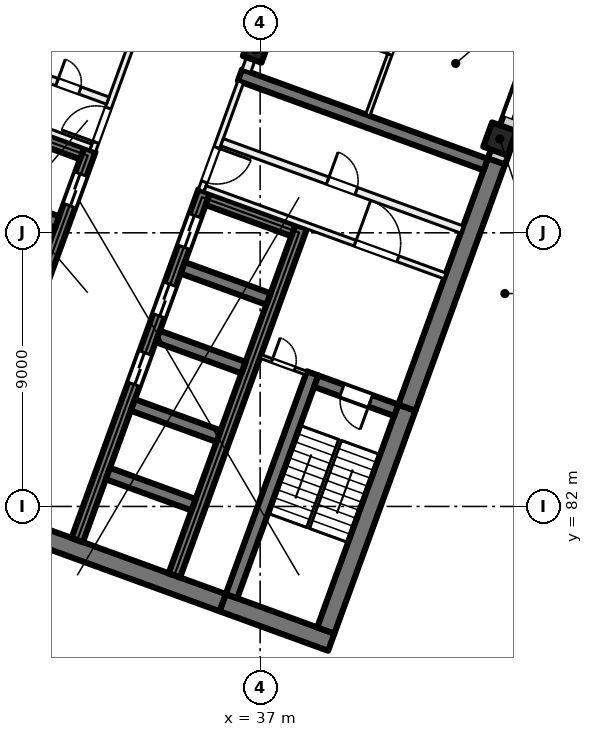
"""IFC4 building model, lengths in metres.
Left out: names, types, materials, properties, quantities, classifications, styles, units other than length and angle.
Written with IfcOpenShell. Run it as: python <this file> out.ifc"""

import sys

from ifc_helpers import new_model, si_unit, direction, frame, frame_2d, origin, origin_2d, place, context, subcontext, project, spatial, rectangle, extrude, element, fill, save


model = new_model("IFC4")
c1 = context("Model", 3, precision=1e-05, world=origin(), true_north=direction((0.0, 1.0)))
c2 = subcontext(c1, "Body", "Model", "MODEL_VIEW")
j1 = project(units=[si_unit("LENGTHUNIT", "METRE"), si_unit("PLANEANGLEUNIT", "RADIAN")], contexts=[c1])
p1 = place(None, origin())
s1 = spatial("IfcSite", under=j1, at=p1, CompositionType="ELEMENT")
p2 = place(p1, origin())
s2 = spatial("IfcBuilding", under=s1, at=p2, CompositionType="ELEMENT")
p3 = place(p2, frame((0.0, 0.0, 85.0)))
s3 = spatial("IfcBuildingStorey", under=s2, at=p3, CompositionType="ELEMENT", Elevation=85.0)
p4 = place(p3, frame((36.849, 97.011, 0.0), z_axis=(0.0, 0.0, 1.0), x_axis=(-0.342020143326, -0.939692620786, 0.0)))
e1 = element("IfcColumn", 1, at=p4, inside=s3, PredefinedType="COLUMN", context=c2, shape_type="SweptSolid", body=[
    extrude(rectangle(XDim=0.65, YDim=0.65, at=origin_2d()), origin(), (0.0, 0.0, 1.0), 4.0),
])
p5 = place(p3, frame((44.884, 94.087, 0.0), z_axis=(0.0, 0.0, 1.0), x_axis=(-0.342020143326, -0.939692620786, 0.0)))
e2 = element("IfcColumn", 2, at=p5, inside=s3, PredefinedType="COLUMN", context=c2, shape_type="SweptSolid", body=[
    extrude(rectangle(XDim=0.85, YDim=0.85, at=origin_2d()), origin(), (0.0, 0.0, 1.0), 4.0),
])
p6 = place(p3, frame((39.338, 77.535, 0.0), z_axis=(0.0, 0.0, 1.0), x_axis=(-0.939701471648, 0.341995824804, 0.0)))
e3 = element("IfcWall", 3, at=p6, inside=s3, PredefinedType="SHEAR", context=c2, shape_type="SweptSolid", body=[
    extrude(rectangle(XDim=3.8, YDim=0.6, at=frame_2d((1.9, 0.0))), origin(), (0.0, 0.0, 1.0), 4.0),
])
p7 = place(p3, frame((35.767, 78.835, 0.0), z_axis=(0.0, 0.0, 1.0), x_axis=(-0.939692894512, 0.342019391267, 0.0)))
e4 = element("IfcWall", 4, at=p7, inside=s3, PredefinedType="SHEAR", context=c2, shape_type="SweptSolid", body=[
    extrude(rectangle(XDim=14.4, YDim=0.6, at=frame_2d((7.2, 0.0))), origin(), (0.0, 0.0, 1.0), 4.0),
])
p8 = place(p3, frame((39.159, 77.92, 0.0), z_axis=(0.0, 0.0, 1.0), x_axis=(0.342016982193, 0.939693771338, 0.0)))
e5 = element("IfcWall", 5, at=p8, inside=s3, PredefinedType="SHEAR", context=c2, shape_type="SweptSolid", body=[
    extrude(rectangle(XDim=7.8, YDim=0.6, at=frame_2d((3.9, 0.0))), origin(), (0.0, 0.0, 1.0), 4.0),
])
p9 = place(p3, frame((41.827, 85.249, 0.0), z_axis=(0.0, 0.0, 1.0), x_axis=(0.342017595281, 0.939693548195, 0.0)))
e6 = element("IfcWall", 6, at=p9, inside=s3, PredefinedType="SHEAR", context=c2, shape_type="SweptSolid", body=[
    extrude(rectangle(XDim=8.925, YDim=0.6, at=frame_2d((4.462, 0.0))), origin(), (0.0, 0.0, 1.0), 4.0),
])
p10 = place(p3, frame((36.058, 79.048, 0.0), z_axis=(0.0, 0.0, 1.0), x_axis=(0.342016982193, 0.939693771338, 0.0)))
e7 = element("IfcWall", 7, at=p10, inside=s3, PredefinedType="SHEAR", context=c2, shape_type="SweptSolid", body=[
    extrude(rectangle(XDim=7.8, YDim=0.4, at=frame_2d((3.9, 0.0))), origin(), (0.0, 0.0, 1.0), 4.0),
])
p11 = place(p3, frame((41.476, 85.164, 0.0), z_axis=(0.0, 0.0, 1.0), x_axis=(-0.939678810556, 0.342058084236, 0.0)))
e8 = element("IfcWall", 8, at=p11, inside=s3, PredefinedType="SHEAR", context=c2, shape_type="SweptSolid", body=[
    extrude(rectangle(XDim=2.8, YDim=0.4, at=frame_2d((1.4, 0.0))), origin(), (0.0, 0.0, 1.0), 4.0),
])
p12 = place(p11, frame((0.9, 0.0, 0.0)))
e9 = element("IfcOpeningElement", 9, at=p12, cuts=e8, PredefinedType="OPENING", context=c2, shape_type="SweptSolid", body=[
    extrude(rectangle(XDim=1.0, YDim=2.1, at=frame_2d((0.5, 1.05))), frame((0.0, 0.21, 0.0), z_axis=(0.0, -1.0, 0.0), x_axis=(1.0, 0.0, 0.0)), (0.0, 0.0, 1.0), 0.42),
])
p13 = place(p3, frame((30.984, 80.895, 0.0), z_axis=(0.0, 0.0, 1.0), x_axis=(0.342021021735, 0.939692301071, 0.0)))
e10 = element("IfcWall", 10, at=p13, inside=s3, PredefinedType="SHEAR", context=c2, shape_type="SweptSolid", body=[
    extrude(rectangle(XDim=12.2, YDim=0.4, at=frame_2d((6.1, 0.0))), origin(), (0.0, 0.0, 1.0), 4.0),
])
p14 = place(p13, frame((5.45, 0.0, 0.0)))
e11 = element("IfcOpeningElement", 11, at=p14, cuts=e10, PredefinedType="OPENING", context=c2, shape_type="SweptSolid", body=[
    extrude(rectangle(XDim=1.1, YDim=2.1, at=frame_2d((0.55, 1.05))), frame((0.0, 0.21, 0.0), z_axis=(0.0, -1.0, 0.0), x_axis=(1.0, 0.0, 0.0)), (0.0, 0.0, 1.0), 0.42),
])
p15 = place(p13, frame((7.85, 0.0, 0.0)))
e12 = element("IfcOpeningElement", 12, at=p15, cuts=e10, PredefinedType="OPENING", context=c2, shape_type="SweptSolid", body=[
    extrude(rectangle(XDim=1.1, YDim=2.1, at=frame_2d((0.55, 1.05))), frame((0.0, 0.21, 0.0), z_axis=(0.0, -1.0, 0.0), x_axis=(1.0, 0.0, 0.0)), (0.0, 0.0, 1.0), 0.42),
])
p16 = place(p13, frame((10.25, 0.0, 0.0)))
e13 = element("IfcOpeningElement", 13, at=p16, cuts=e10, PredefinedType="OPENING", context=c2, shape_type="SweptSolid", body=[
    extrude(rectangle(XDim=1.1, YDim=2.1, at=frame_2d((0.55, 1.05))), frame((0.0, 0.21, 0.0), z_axis=(0.0, -1.0, 0.0), x_axis=(1.0, 0.0, 0.0)), (0.0, 0.0, 1.0), 0.42),
])
p17 = place(p3, frame((34.178, 79.732, 0.0), z_axis=(0.0, 0.0, 1.0), x_axis=(0.342014590177, 0.939694641948, 0.0)))
e14 = element("IfcWall", 14, at=p17, inside=s3, PredefinedType="SHEAR", context=c2, shape_type="SweptSolid", body=[
    extrude(rectangle(XDim=12.2, YDim=0.4, at=frame_2d((6.1, 0.0))), origin(), (0.0, 0.0, 1.0), 4.0),
])
for number, where, z_axis, x_axis in (
    (15, (34.812, 82.056, 0.0), (0.0, 0.0, 1.0), (-0.94, 0.342, 0.0)),
    (16, (35.632, 84.311, 0.0), (0.0, 0.0, 1.0), (-0.94, 0.342, 0.0)),
    (17, (36.453, 86.566, 0.0), (0.0, 0.0, 1.0), (-0.94, 0.342, 0.0)),
    (18, (37.274, 88.822, 0.0), (0.0, 0.0, 1.0), (-0.94, 0.342, 0.0)),
):
    element("IfcWall", number, at=place(p3, frame(where, z_axis=z_axis, x_axis=x_axis)), inside=s3, PredefinedType="SHEAR", context=c2, shape_type="SweptSolid", body=[
        extrude(rectangle(XDim=3.0, YDim=0.4, at=frame_2d((1.5, 0.0))), origin(), (0.0, 0.0, 1.0), 4.0),
    ])
p18 = place(p3, frame((38.095, 91.077, 0.0), z_axis=(0.0, 0.0, 1.0), x_axis=(-0.939676934218, 0.342063238742, 0.0)))
e19 = element("IfcWall", 19, at=p18, inside=s3, PredefinedType="SHEAR", context=c2, shape_type="SweptSolid", body=[
    extrude(rectangle(XDim=3.0, YDim=0.4, at=frame_2d((1.5, 0.0))), origin(), (0.0, 0.0, 1.0), 4.0),
])
p19 = place(p3, frame((27.225, 82.263, 0.0), z_axis=(0.0, 0.0, 1.0), x_axis=(0.342014590177, 0.939694641948, 0.0)))
e20 = element("IfcWall", 20, at=p19, inside=s3, PredefinedType="SHEAR", context=c2, shape_type="SweptSolid", body=[
    extrude(rectangle(XDim=12.2, YDim=0.4, at=frame_2d((6.1, 0.0))), origin(), (0.0, 0.0, 1.0), 4.0),
])
p20 = place(p19, frame((10.25, 0.0, 0.0)))
e21 = element("IfcOpeningElement", 21, at=p20, cuts=e20, PredefinedType="OPENING", context=c2, shape_type="SweptSolid", body=[
    extrude(rectangle(XDim=1.1, YDim=2.1, at=frame_2d((0.55, 1.05))), frame((0.0, 0.21, 0.0), z_axis=(0.0, -1.0, 0.0), x_axis=(1.0, 0.0, 0.0)), (0.0, 0.0, 1.0), 0.42),
])
p21 = place(p19, frame((0.7, 0.0, 0.0)))
e22 = element("IfcOpeningElement", 22, at=p21, cuts=e20, PredefinedType="OPENING", context=c2, shape_type="SweptSolid", body=[
    extrude(rectangle(XDim=0.8, YDim=2.1, at=frame_2d((0.4, 1.05))), frame((0.0, 0.21, 0.0), z_axis=(0.0, -1.0, 0.0), x_axis=(1.0, 0.0, 0.0)), (0.0, 0.0, 1.0), 0.42),
])
for number, where, z_axis, x_axis in (
    (23, (30.32, 91.353, 0.0), (0.0, 0.0, 1.0), (-0.94, 0.342, 0.0)),
    (24, (31.141, 93.608, 0.0), (0.0, 0.0, 1.0), (-0.94, 0.342, 0.0)),
):
    element("IfcWall", number, at=place(p3, frame(where, z_axis=z_axis, x_axis=x_axis)), inside=s3, PredefinedType="SHEAR", context=c2, shape_type="SweptSolid", body=[
        extrude(rectangle(XDim=3.0, YDim=0.4, at=frame_2d((1.5, 0.0))), origin(), (0.0, 0.0, 1.0), 4.0),
    ])
p22 = place(p3, frame((44.418, 93.245, 0.0), z_axis=(0.0, 0.0, 1.0), x_axis=(-0.93969060187, 0.342025690201, 0.0)))
e25 = element("IfcWall", 25, at=p22, inside=s3, PredefinedType="SHEAR", context=c2, shape_type="SweptSolid", body=[
    extrude(rectangle(XDim=8.6, YDim=0.4, at=frame_2d((4.3, 0.0))), origin(), (0.0, 0.0, 1.0), 4.0),
])
p23 = place(p3, frame((52.212, 113.783, 0.0), z_axis=(0.0, 0.0, 1.0), x_axis=(-0.34202521188, -0.939690775968, 0.0)))
e26 = element("IfcWall", 26, at=p23, inside=s3, PredefinedType="SOLIDWALL", context=c2, shape_type="SweptSolid", body=[
    extrude(rectangle(XDim=21.745, YDim=0.6, at=frame_2d((10.873, 0.0))), origin(), (0.0, 0.0, 1.0), 3.625),
])
p24 = place(p23, frame((3.765, 0.0, 0.9)))
e27 = element("IfcOpeningElement", 27, at=p24, cuts=e26, PredefinedType="OPENING", context=c2, shape_type="SweptSolid", body=[
    extrude(rectangle(XDim=3.0, YDim=2.4, at=frame_2d((1.5, 1.2))), frame((0.0, 0.31, 0.0), z_axis=(0.0, -1.0, 0.0), x_axis=(1.0, 0.0, 0.0)), (0.0, 0.0, 1.0), 0.62),
])
p25 = place(p23, frame((8.265, 0.0, 0.9)))
e28 = element("IfcOpeningElement", 28, at=p25, cuts=e26, PredefinedType="OPENING", context=c2, shape_type="SweptSolid", body=[
    extrude(rectangle(XDim=3.0, YDim=2.4, at=frame_2d((1.5, 1.2))), frame((0.0, 0.31, 0.0), z_axis=(0.0, -1.0, 0.0), x_axis=(1.0, 0.0, 0.0)), (0.0, 0.0, 1.0), 0.62),
])
p26 = place(p23, frame((12.765, 0.0, 0.9)))
e29 = element("IfcOpeningElement", 29, at=p26, cuts=e26, PredefinedType="OPENING", context=c2, shape_type="SweptSolid", body=[
    extrude(rectangle(XDim=3.0, YDim=2.4, at=frame_2d((1.5, 1.2))), frame((0.0, 0.31, 0.0), z_axis=(0.0, -1.0, 0.0), x_axis=(1.0, 0.0, 0.0)), (0.0, 0.0, 1.0), 0.62),
])
p27 = place(p23, frame((17.265, 0.0, 0.9)))
e30 = element("IfcOpeningElement", 30, at=p27, cuts=e26, PredefinedType="OPENING", context=c2, shape_type="SweptSolid", body=[
    extrude(rectangle(XDim=3.0, YDim=2.4, at=frame_2d((1.5, 1.2))), frame((0.0, 0.31, 0.0), z_axis=(0.0, -1.0, 0.0), x_axis=(1.0, 0.0, 0.0)), (0.0, 0.0, 1.0), 0.62),
])
p28 = place(p3, frame((31.491, 93.693, 0.0), z_axis=(0.0, 0.0, 1.0), x_axis=(0.341995824804, 0.939701471648, 0.0)))
e31 = element("IfcWall", 31, at=p28, inside=s3, PredefinedType="PARTITIONING", context=c2, shape_type="SweptSolid", body=[
    extrude(rectangle(XDim=3.8, YDim=0.2, at=frame_2d((1.9, 0.0))), origin(), (0.0, 0.0, 1.0), 3.625),
])
p29 = place(p28, frame((0.3, 0.0, 0.0)))
e32 = element("IfcOpeningElement", 32, at=p29, cuts=e31, PredefinedType="OPENING", context=c2, shape_type="SweptSolid", body=[
    extrude(rectangle(XDim=1.2, YDim=2.1, at=frame_2d((0.6, 1.05))), frame((0.0, 0.11, 0.0), z_axis=(0.0, -1.0, 0.0), x_axis=(1.0, 0.0, 0.0)), (0.0, 0.0, 1.0), 0.22),
])
p30 = place(p3, frame((23.538, 96.694, 0.0), z_axis=(0.0, 0.0, 1.0), x_axis=(0.939691552312, -0.342023078919, 0.0)))
e33 = element("IfcWall", 33, at=p30, inside=s3, PredefinedType="PARTITIONING", context=c2, shape_type="SweptSolid", body=[
    extrude(rectangle(XDim=8.4, YDim=0.2, at=frame_2d((4.2, 0.0))), origin(), (0.0, 0.0, 1.0), 3.625),
])
p31 = place(p30, frame((1.65, 0.0, 0.0)))
e34 = element("IfcOpeningElement", 34, at=p31, cuts=e33, PredefinedType="OPENING", context=c2, shape_type="SweptSolid", body=[
    extrude(rectangle(XDim=1.5, YDim=2.1, at=frame_2d((0.75, 1.05))), frame((0.0, 0.11, 0.0), z_axis=(0.0, -1.0, 0.0), x_axis=(1.0, 0.0, 0.0)), (0.0, 0.0, 1.0), 0.22),
])
p32 = place(p3, frame((24.094, 98.221, 0.0), z_axis=(0.0, 0.0, 1.0), x_axis=(0.939691552312, -0.342023078919, 0.0)))
e35 = element("IfcWall", 35, at=p32, inside=s3, PredefinedType="PARTITIONING", context=c2, shape_type="SweptSolid", body=[
    extrude(rectangle(XDim=8.4, YDim=0.25, at=frame_2d((4.2, 0.0))), origin(), (0.0, 0.0, 1.0), 3.625),
])
p33 = place(p32, frame((6.625, 0.0, 0.0)))
e36 = element("IfcOpeningElement", 36, at=p33, cuts=e35, PredefinedType="OPENING", context=c2, shape_type="SweptSolid", body=[
    extrude(rectangle(XDim=0.8, YDim=2.1, at=frame_2d((0.4, 1.05))), frame((0.0, 0.135, 0.0), z_axis=(0.0, -1.0, 0.0), x_axis=(1.0, 0.0, 0.0)), (0.0, 0.0, 1.0), 0.27),
])
p34 = place(p32, frame((2.375, 0.0, 0.0)))
e37 = element("IfcOpeningElement", 37, at=p34, cuts=e35, PredefinedType="OPENING", context=c2, shape_type="SweptSolid", body=[
    extrude(rectangle(XDim=0.8, YDim=2.1, at=frame_2d((0.4, 1.05))), frame((0.0, 0.135, 0.0), z_axis=(0.0, -1.0, 0.0), x_axis=(1.0, 0.0, 0.0)), (0.0, 0.0, 1.0), 0.27),
])
p35 = place(p3, frame((36.362, 95.964, 0.0), z_axis=(0.0, 0.0, 1.0), x_axis=(-0.341995824804, -0.939701471648, 0.0)))
e38 = element("IfcWall", 38, at=p35, inside=s3, PredefinedType="PARTITIONING", context=c2, shape_type="SweptSolid", body=[
    extrude(rectangle(XDim=3.8, YDim=0.2, at=frame_2d((1.9, 0.0))), origin(), (0.0, 0.0, 1.0), 3.625),
])
p36 = place(p35, frame((2.3, 0.0, 0.0)))
e39 = element("IfcOpeningElement", 39, at=p36, cuts=e38, PredefinedType="OPENING", context=c2, shape_type="SweptSolid", body=[
    extrude(rectangle(XDim=1.2, YDim=2.1, at=frame_2d((0.6, 1.05))), frame((0.0, 0.11, 0.0), z_axis=(0.0, -1.0, 0.0), x_axis=(1.0, 0.0, 0.0)), (0.0, 0.0, 1.0), 0.22),
])
p37 = place(p3, frame((35.19, 92.453, 0.0), z_axis=(0.0, 0.0, 1.0), x_axis=(0.939691552312, -0.342023078919, 0.0)))
e40 = element("IfcWall", 40, at=p37, inside=s3, PredefinedType="PARTITIONING", context=c2, shape_type="SweptSolid", body=[
    extrude(rectangle(XDim=8.4, YDim=0.2, at=frame_2d((4.2, 0.0))), origin(), (0.0, 0.0, 1.0), 3.625),
])
p38 = place(p37, frame((5.25, 0.0, 0.0)))
e41 = element("IfcOpeningElement", 41, at=p38, cuts=e40, PredefinedType="OPENING", context=c2, shape_type="SweptSolid", body=[
    extrude(rectangle(XDim=1.5, YDim=2.1, at=frame_2d((0.75, 1.05))), frame((0.0, 0.11, 0.0), z_axis=(0.0, -1.0, 0.0), x_axis=(1.0, 0.0, 0.0)), (0.0, 0.0, 1.0), 0.22),
])
p39 = place(p3, frame((35.746, 93.98, 0.0), z_axis=(0.0, 0.0, 1.0), x_axis=(0.939691552312, -0.342023078919, 0.0)))
e42 = element("IfcWall", 42, at=p39, inside=s3, PredefinedType="PARTITIONING", context=c2, shape_type="SweptSolid", body=[
    extrude(rectangle(XDim=8.4, YDim=0.25, at=frame_2d((4.2, 0.0))), origin(), (0.0, 0.0, 1.0), 3.625),
])
p40 = place(p39, frame((3.7, 0.0, 0.0)))
e43 = element("IfcOpeningElement", 43, at=p40, cuts=e42, PredefinedType="OPENING", context=c2, shape_type="SweptSolid", body=[
    extrude(rectangle(XDim=1.0, YDim=2.1, at=frame_2d((0.5, 1.05))), frame((0.0, 0.135, 0.0), z_axis=(0.0, -1.0, 0.0), x_axis=(1.0, 0.0, 0.0)), (0.0, 0.0, 1.0), 0.27),
])
p41 = place(p3, frame((37.013, 86.935, 0.0), z_axis=(0.0, 0.0, 1.0), x_axis=(0.939659694648, -0.342110593602, 0.0)))
e44 = element("IfcWall", 44, at=p41, inside=s3, PredefinedType="PARTITIONING", context=c2, shape_type="SweptSolid", body=[
    extrude(rectangle(XDim=1.6, YDim=0.125, at=frame_2d((0.8, 0.0))), origin(), (0.0, 0.0, 1.0), 3.625),
])
p42 = place(p41, frame((0.4, 0.0, 0.0)))
e45 = element("IfcOpeningElement", 45, at=p42, cuts=e44, PredefinedType="OPENING", context=c2, shape_type="SweptSolid", body=[
    extrude(rectangle(XDim=0.8, YDim=2.1, at=frame_2d((0.4, 1.05))), frame((0.0, 0.073, 0.0), z_axis=(0.0, -1.0, 0.0), x_axis=(1.0, 0.0, 0.0)), (0.0, 0.0, 1.0), 0.145),
])
p43 = place(p3, frame((40.539, 94.87, 0.0), z_axis=(0.0, 0.0, 1.0), x_axis=(0.342082231415, 0.939670020247, 0.0)))
e46 = element("IfcWall", 46, at=p43, inside=s3, PredefinedType="PARTITIONING", context=c2, shape_type="SweptSolid", body=[
    extrude(rectangle(XDim=9.825, YDim=0.15, at=frame_2d((4.912, 0.0))), origin(), (0.0, 0.0, 1.0), 3.625),
])
p44 = place(p43, frame((2.125, 0.0, 0.0)))
e47 = element("IfcOpeningElement", 47, at=p44, cuts=e46, PredefinedType="OPENING", context=c2, shape_type="SweptSolid", body=[
    extrude(rectangle(XDim=1.0, YDim=2.1, at=frame_2d((0.5, 1.05))), frame((0.0, 0.085, 0.0), z_axis=(0.0, -1.0, 0.0), x_axis=(1.0, 0.0, 0.0)), (0.0, 0.0, 1.0), 0.17),
])
p45 = place(p43, frame((7.0, 0.0, 0.0)))
e48 = element("IfcOpeningElement", 48, at=p45, cuts=e46, PredefinedType="OPENING", context=c2, shape_type="SweptSolid", body=[
    extrude(rectangle(XDim=1.0, YDim=2.1, at=frame_2d((0.5, 1.05))), frame((0.0, 0.085, 0.0), z_axis=(0.0, -1.0, 0.0), x_axis=(1.0, 0.0, 0.0)), (0.0, 0.0, 1.0), 0.17),
])
p46 = place(p3, frame((47.314, 125.909, 0.0), z_axis=(0.0, 0.0, 1.0), x_axis=(-0.342010770371, -0.939696032209, 0.0)))
e49 = element("IfcWall", 49, at=p46, inside=s3, PredefinedType="PARTITIONING", context=c2, shape_type="SweptSolid", body=[
    extrude(rectangle(XDim=31.485, YDim=0.3, at=frame_2d((15.742, 0.0))), origin(), (0.0, 0.0, 1.0), 3.625),
])
p47 = place(p46, frame((23.459, 0.0, 0.0)))
e50 = element("IfcOpeningElement", 50, at=p47, cuts=e49, PredefinedType="OPENING", context=c2, shape_type="SweptSolid", body=[
    extrude(rectangle(XDim=1.8, YDim=2.1, at=frame_2d((0.9, 1.05))), frame((0.0, 0.16, 0.0), z_axis=(0.0, -1.0, 0.0), x_axis=(1.0, 0.0, 0.0)), (0.0, 0.0, 1.0), 0.32),
])
p48 = place(p46, frame((5.484, 0.0, 0.0)))
e51 = element("IfcOpeningElement", 51, at=p48, cuts=e49, PredefinedType="OPENING", context=c2, shape_type="SweptSolid", body=[
    extrude(rectangle(XDim=1.0, YDim=2.1, at=frame_2d((0.5, 1.05))), frame((0.0, 0.16, 0.0), z_axis=(0.0, -1.0, 0.0), x_axis=(1.0, 0.0, 0.0)), (0.0, 0.0, 1.0), 0.32),
])
p49 = place(p27, origin())
e52 = element("IfcWindow", 52, at=p49, inside=s3, PartitioningType="SINGLE_PANEL", PredefinedType="WINDOW", context=c2, shape_type="SweptSolid", body=[
    extrude(rectangle(XDim=3.0, YDim=2.4, at=frame_2d((1.5, 1.2))), frame((0.0, 0.03, 0.0), z_axis=(0.0, -1.0, 0.0), x_axis=(1.0, 0.0, 0.0)), (0.0, 0.0, 1.0), 0.06),
])
fill(e30, e52)
p50 = place(p20, origin())
e53 = element("IfcDoor", 53, at=p50, inside=s3, OperationType="DOUBLE_DOOR_SLIDING", PredefinedType="DOOR", context=c2, shape_type="SweptSolid", body=[
    extrude(rectangle(XDim=1.1, YDim=2.1, at=frame_2d((0.55, 1.05))), frame((0.0, 0.025, 0.0), z_axis=(0.0, -1.0, 0.0), x_axis=(1.0, 0.0, 0.0)), (0.0, 0.0, 1.0), 0.05),
])
fill(e21, e53)
p51 = place(p14, origin())
e54 = element("IfcDoor", 54, at=p51, inside=s3, OperationType="DOUBLE_DOOR_SLIDING", PredefinedType="DOOR", context=c2, shape_type="SweptSolid", body=[
    extrude(rectangle(XDim=1.1, YDim=2.1, at=frame_2d((0.55, 1.05))), frame((0.0, 0.025, 0.0), z_axis=(0.0, -1.0, 0.0), x_axis=(1.0, 0.0, 0.0)), (0.0, 0.0, 1.0), 0.05),
])
fill(e11, e54)
p52 = place(p15, origin())
e55 = element("IfcDoor", 55, at=p52, inside=s3, OperationType="DOUBLE_DOOR_SLIDING", PredefinedType="DOOR", context=c2, shape_type="SweptSolid", body=[
    extrude(rectangle(XDim=1.1, YDim=2.1, at=frame_2d((0.55, 1.05))), frame((0.0, 0.025, 0.0), z_axis=(0.0, -1.0, 0.0), x_axis=(1.0, 0.0, 0.0)), (0.0, 0.0, 1.0), 0.05),
])
fill(e12, e55)
p53 = place(p16, origin())
e56 = element("IfcDoor", 56, at=p53, inside=s3, OperationType="DOUBLE_DOOR_SLIDING", PredefinedType="DOOR", context=c2, shape_type="SweptSolid", body=[
    extrude(rectangle(XDim=1.1, YDim=2.1, at=frame_2d((0.55, 1.05))), frame((0.0, 0.025, 0.0), z_axis=(0.0, -1.0, 0.0), x_axis=(1.0, 0.0, 0.0)), (0.0, 0.0, 1.0), 0.05),
])
fill(e13, e56)
p54 = place(p29, origin())
e57 = element("IfcDoor", 57, at=p54, inside=s3, OperationType="DOUBLE_DOOR_SINGLE_SWING", PredefinedType="DOOR", context=c2, shape_type="SweptSolid", body=[
    extrude(rectangle(XDim=1.2, YDim=2.1, at=frame_2d((0.6, 1.05))), frame((0.0, 0.025, 0.0), z_axis=(0.0, -1.0, 0.0), x_axis=(1.0, 0.0, 0.0)), (0.0, 0.0, 1.0), 0.05),
])
fill(e32, e57)
p55 = place(p33, origin())
e58 = element("IfcDoor", 58, at=p55, inside=s3, OperationType="SINGLE_SWING_LEFT", PredefinedType="DOOR", context=c2, shape_type="SweptSolid", body=[
    extrude(rectangle(XDim=0.8, YDim=2.1, at=frame_2d((0.4, 1.05))), frame((0.0, 0.025, 0.0), z_axis=(0.0, -1.0, 0.0), x_axis=(1.0, 0.0, 0.0)), (0.0, 0.0, 1.0), 0.05),
])
fill(e36, e58)
p56 = place(p36, origin())
e59 = element("IfcDoor", 59, at=p56, inside=s3, OperationType="DOUBLE_DOOR_SINGLE_SWING", PredefinedType="DOOR", context=c2, shape_type="SweptSolid", body=[
    extrude(rectangle(XDim=1.2, YDim=2.1, at=frame_2d((0.6, 1.05))), frame((0.0, 0.025, 0.0), z_axis=(0.0, -1.0, 0.0), x_axis=(1.0, 0.0, 0.0)), (0.0, 0.0, 1.0), 0.05),
])
fill(e39, e59)
p57 = place(p38, origin())
e60 = element("IfcDoor", 60, at=p57, inside=s3, OperationType="DOUBLE_DOOR_SINGLE_SWING", PredefinedType="DOOR", context=c2, shape_type="SweptSolid", body=[
    extrude(rectangle(XDim=1.5, YDim=2.1, at=frame_2d((0.75, 1.05))), frame((0.0, 0.025, 0.0), z_axis=(0.0, -1.0, 0.0), x_axis=(1.0, 0.0, 0.0)), (0.0, 0.0, 1.0), 0.05),
])
fill(e41, e60)
p58 = place(p12, origin())
e61 = element("IfcDoor", 61, at=p58, inside=s3, OperationType="SINGLE_SWING_RIGHT", PredefinedType="DOOR", context=c2, shape_type="SweptSolid", body=[
    extrude(rectangle(XDim=1.0, YDim=2.1, at=frame_2d((0.5, 1.05))), frame((0.0, 0.025, 0.0), z_axis=(0.0, -1.0, 0.0), x_axis=(1.0, 0.0, 0.0)), (0.0, 0.0, 1.0), 0.05),
])
fill(e9, e61)
p59 = place(p42, origin())
e62 = element("IfcDoor", 62, at=p59, inside=s3, OperationType="SINGLE_SWING_LEFT", PredefinedType="DOOR", context=c2, shape_type="SweptSolid", body=[
    extrude(rectangle(XDim=0.8, YDim=2.1, at=frame_2d((0.4, 1.05))), frame((0.0, 0.025, 0.0), z_axis=(0.0, -1.0, 0.0), x_axis=(1.0, 0.0, 0.0)), (0.0, 0.0, 1.0), 0.05),
])
fill(e45, e62)
p60 = place(p40, origin())
e63 = element("IfcDoor", 63, at=p60, inside=s3, OperationType="SINGLE_SWING_RIGHT", PredefinedType="DOOR", context=c2, shape_type="SweptSolid", body=[
    extrude(rectangle(XDim=1.0, YDim=2.1, at=frame_2d((0.5, 1.05))), frame((0.0, 0.025, 0.0), z_axis=(0.0, -1.0, 0.0), x_axis=(1.0, 0.0, 0.0)), (0.0, 0.0, 1.0), 0.05),
])
fill(e43, e63)
p61 = place(p44, origin())
e64 = element("IfcDoor", 64, at=p61, inside=s3, OperationType="SINGLE_SWING_LEFT", PredefinedType="DOOR", context=c2, shape_type="SweptSolid", body=[
    extrude(rectangle(XDim=1.0, YDim=2.1, at=frame_2d((0.5, 1.05))), frame((0.0, 0.025, 0.0), z_axis=(0.0, -1.0, 0.0), x_axis=(1.0, 0.0, 0.0)), (0.0, 0.0, 1.0), 0.05),
])
fill(e47, e64)
save(model, sys.argv[1])
